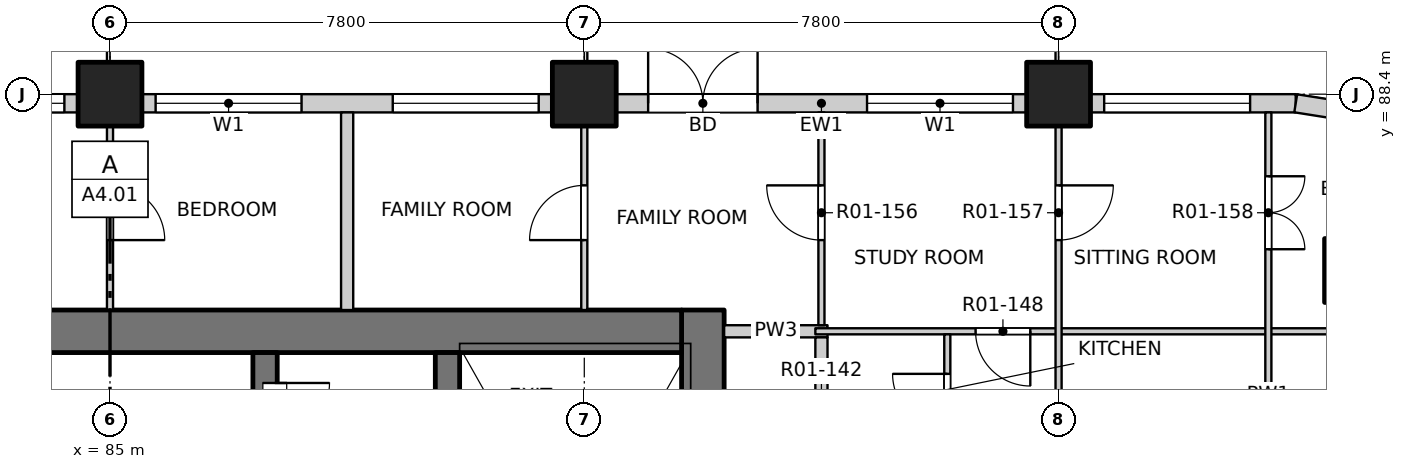
"""IFC4 building model, lengths in metres.
Left out: names, types, materials, properties, quantities, classifications, styles, units other than length and angle.
Written with IfcOpenShell. Run it as: python <this file> out.ifc"""

import sys

from ifc_helpers import new_model, si_unit, direction, frame, frame_2d, origin, origin_2d, place, context, subcontext, project, spatial, rectangle, extrude, element, fill, save


model = new_model("IFC4")
c1 = context("Model", 3, precision=1e-05, world=origin(), true_north=direction((0.0, 1.0)))
c2 = subcontext(c1, "Body", "Model", "MODEL_VIEW")
j1 = project(units=[si_unit("LENGTHUNIT", "METRE"), si_unit("PLANEANGLEUNIT", "RADIAN")], contexts=[c1])
p1 = place(None, origin())
s1 = spatial("IfcSite", under=j1, at=p1, CompositionType="ELEMENT")
p2 = place(p1, origin())
s2 = spatial("IfcBuilding", under=s1, at=p2, CompositionType="ELEMENT")
p3 = place(p2, frame((0.0, 0.0, 19.5)))
s3 = spatial("IfcBuildingStorey", under=s2, at=p3, CompositionType="ELEMENT", Elevation=19.5)
for number, where, z_axis, x_axis in (
    (1, (105.5, 85.5, -0.25), (0.0, 0.0, 1.0), (1.0, 0.0, 0.0)),
    (2, (85.0, 88.4, -0.25), (0.0, 0.0, 1.0), (1.0, 0.0, 0.0)),
    (3, (92.8, 88.4, -0.25), (0.0, 0.0, 1.0), (1.0, 0.0, 0.0)),
    (4, (100.6, 88.4, -0.25), (0.0, 0.0, 1.0), (1.0, 0.0, 0.0)),
):
    element("IfcColumn", number, at=place(p3, frame(where, z_axis=z_axis, x_axis=x_axis)), inside=s3, PredefinedType="COLUMN", context=c2, shape_type="SweptSolid", body=[
        extrude(rectangle(XDim=1.05, YDim=1.05, at=origin_2d()), origin(), (0.0, 0.0, 1.0), 3.4),
    ])
p4 = place(p3, frame((94.75, 77.3, -0.25), z_axis=(0.0, 0.0, 1.0), x_axis=(0.0, 1.0, 0.0)))
e5 = element("IfcWall", 5, at=p4, inside=s3, PredefinedType="SOLIDWALL", context=c2, shape_type="SweptSolid", body=[
    extrude(rectangle(XDim=7.55, YDim=0.7, at=frame_2d((3.775, 0.0))), origin(), (0.0, 0.0, 1.0), 3.4),
])
p5 = place(p4, frame((0.3, 0.0, 0.25)))
e6 = element("IfcOpeningElement", 6, at=p5, cuts=e5, PredefinedType="OPENING", context=c2, shape_type="SweptSolid", body=[
    extrude(rectangle(XDim=1.2, YDim=2.1, at=frame_2d((0.6, 1.05))), frame((0.0, 0.36, 0.0), z_axis=(0.0, -1.0, 0.0), x_axis=(1.0, 0.0, 0.0)), (0.0, 0.0, 1.0), 0.72),
])
p6 = place(p3, frame((75.6, 84.5, -0.25), z_axis=(0.0, 0.0, 1.0), x_axis=(1.0, 0.0, 0.0)))
e7 = element("IfcWall", 7, at=p6, inside=s3, PredefinedType="SOLIDWALL", context=c2, shape_type="SweptSolid", body=[
    extrude(rectangle(XDim=18.8, YDim=0.7, at=frame_2d((9.4, 0.0))), origin(), (0.0, 0.0, 1.0), 3.4),
])
p7 = place(p3, frame((90.55, 77.3, -0.25), z_axis=(0.0, 0.0, 1.0), x_axis=(0.0, 1.0, 0.0)))
e8 = element("IfcWall", 8, at=p7, inside=s3, PredefinedType="SOLIDWALL", context=c2, shape_type="SweptSolid", body=[
    extrude(rectangle(XDim=6.85, YDim=0.4, at=frame_2d((3.425, 0.0))), origin(), (0.0, 0.0, 1.0), 3.4),
])
p8 = place(p3, frame((87.55, 82.1, -0.25), z_axis=(0.0, 0.0, 1.0), x_axis=(0.0, 1.0, 0.0)))
e9 = element("IfcWall", 9, at=p8, inside=s3, PredefinedType="SOLIDWALL", context=c2, shape_type="SweptSolid", body=[
    extrude(rectangle(XDim=2.05, YDim=0.4, at=frame_2d((1.025, 0.0))), origin(), (0.0, 0.0, 1.0), 3.4),
])
p9 = place(p8, frame((0.65, 0.0, 0.25)))
e10 = element("IfcOpeningElement", 10, at=p9, cuts=e9, PredefinedType="OPENING", context=c2, shape_type="SweptSolid", body=[
    extrude(rectangle(XDim=0.9, YDim=2.1, at=frame_2d((0.45, 1.05))), frame((0.0, 0.21, 0.0), z_axis=(0.0, -1.0, 0.0), x_axis=(1.0, 0.0, 0.0)), (0.0, 0.0, 1.0), 0.42),
])
p10 = place(p3, frame((77.725, 88.25, 0.0), z_axis=(0.0, 0.0, 1.0), x_axis=(1.0, 0.0, 0.0)))
e11 = element("IfcWall", 11, at=p10, inside=s3, PredefinedType="SOLIDWALL", context=c2, shape_type="SweptSolid", body=[
    extrude(rectangle(XDim=6.75, YDim=0.3, at=frame_2d((3.375, 0.0))), origin(), (0.0, 0.0, 1.0), 2.7),
])
p11 = place(p10, frame((0.525, 0.0, 0.0)))
e12 = element("IfcOpeningElement", 12, at=p11, cuts=e11, PredefinedType="OPENING", context=c2, shape_type="SweptSolid", body=[
    extrude(rectangle(XDim=1.8, YDim=2.4, at=frame_2d((0.9, 1.2))), frame((0.0, 0.16, 0.0), z_axis=(0.0, -1.0, 0.0), x_axis=(1.0, 0.0, 0.0)), (0.0, 0.0, 1.0), 0.32),
])
p12 = place(p10, frame((4.125, 0.0, 0.9)))
e13 = element("IfcOpeningElement", 13, at=p12, cuts=e11, PredefinedType="OPENING", context=c2, shape_type="SweptSolid", body=[
    extrude(rectangle(XDim=2.4, YDim=1.8, at=frame_2d((1.2, 0.9))), frame((0.0, 0.16, 0.0), z_axis=(0.0, -1.0, 0.0), x_axis=(1.0, 0.0, 0.0)), (0.0, 0.0, 1.0), 0.32),
])
p13 = place(p3, frame((85.525, 88.25, 0.0), z_axis=(0.0, 0.0, 1.0), x_axis=(1.0, 0.0, 0.0)))
e14 = element("IfcWall", 14, at=p13, inside=s3, PredefinedType="SOLIDWALL", context=c2, shape_type="SweptSolid", body=[
    extrude(rectangle(XDim=6.75, YDim=0.3, at=frame_2d((3.375, 0.0))), origin(), (0.0, 0.0, 1.0), 2.7),
])
p14 = place(p13, frame((0.225, 0.0, 0.9)))
e15 = element("IfcOpeningElement", 15, at=p14, cuts=e14, PredefinedType="OPENING", context=c2, shape_type="SweptSolid", body=[
    extrude(rectangle(XDim=2.4, YDim=1.8, at=frame_2d((1.2, 0.9))), frame((0.0, 0.16, 0.0), z_axis=(0.0, -1.0, 0.0), x_axis=(1.0, 0.0, 0.0)), (0.0, 0.0, 1.0), 0.32),
])
p15 = place(p13, frame((4.125, 0.0, 0.9)))
e16 = element("IfcOpeningElement", 16, at=p15, cuts=e14, PredefinedType="OPENING", context=c2, shape_type="SweptSolid", body=[
    extrude(rectangle(XDim=2.4, YDim=1.8, at=frame_2d((1.2, 0.9))), frame((0.0, 0.16, 0.0), z_axis=(0.0, -1.0, 0.0), x_axis=(1.0, 0.0, 0.0)), (0.0, 0.0, 1.0), 0.32),
])
p16 = place(p3, frame((93.325, 88.25, 0.0), z_axis=(0.0, 0.0, 1.0), x_axis=(1.0, 0.0, 0.0)))
e17 = element("IfcWall", 17, at=p16, inside=s3, PredefinedType="SOLIDWALL", context=c2, shape_type="SweptSolid", body=[
    extrude(rectangle(XDim=6.75, YDim=0.3, at=frame_2d((3.375, 0.0))), origin(), (0.0, 0.0, 1.0), 2.7),
])
p17 = place(p16, frame((0.525, 0.0, 0.0)))
e18 = element("IfcOpeningElement", 18, at=p17, cuts=e17, PredefinedType="OPENING", context=c2, shape_type="SweptSolid", body=[
    extrude(rectangle(XDim=1.8, YDim=2.4, at=frame_2d((0.9, 1.2))), frame((0.0, 0.16, 0.0), z_axis=(0.0, -1.0, 0.0), x_axis=(1.0, 0.0, 0.0)), (0.0, 0.0, 1.0), 0.32),
])
p18 = place(p16, frame((4.125, 0.0, 0.9)))
e19 = element("IfcOpeningElement", 19, at=p18, cuts=e17, PredefinedType="OPENING", context=c2, shape_type="SweptSolid", body=[
    extrude(rectangle(XDim=2.4, YDim=1.8, at=frame_2d((1.2, 0.9))), frame((0.0, 0.16, 0.0), z_axis=(0.0, -1.0, 0.0), x_axis=(1.0, 0.0, 0.0)), (0.0, 0.0, 1.0), 0.32),
])
p19 = place(p3, frame((101.125, 88.25, 0.0), z_axis=(0.0, 0.0, 1.0), x_axis=(1.0, 0.0, 0.0)))
e20 = element("IfcWall", 20, at=p19, inside=s3, PredefinedType="SOLIDWALL", context=c2, shape_type="SweptSolid", body=[
    extrude(rectangle(XDim=3.375, YDim=0.3, at=frame_2d((1.688, 0.0))), origin(), (0.0, 0.0, 1.0), 2.7),
])
p20 = place(p19, frame((0.225, 0.0, 0.9)))
e21 = element("IfcOpeningElement", 21, at=p20, cuts=e20, PredefinedType="OPENING", context=c2, shape_type="SweptSolid", body=[
    extrude(rectangle(XDim=2.4, YDim=1.8, at=frame_2d((1.2, 0.9))), frame((0.0, 0.16, 0.0), z_axis=(0.0, -1.0, 0.0), x_axis=(1.0, 0.0, 0.0)), (0.0, 0.0, 1.0), 0.32),
])
p21 = place(p3, frame((105.659, 88.066, 0.0), z_axis=(0.0, 0.0, 1.0), x_axis=(-0.987678452879, 0.156496880861, 0.0)))
e22 = element("IfcWall", 22, at=p21, inside=s3, PredefinedType="SOLIDWALL", context=c2, shape_type="SweptSolid", body=[
    extrude(rectangle(XDim=1.173, YDim=0.3, at=frame_2d((0.586, 0.0))), origin(), (0.0, 0.0, 1.0), 2.7),
])
p22 = place(p3, frame((95.1, 84.5, 0.0), z_axis=(0.0, 0.0, 1.0), x_axis=(1.0, 0.0, 0.0)))
e23 = element("IfcWall", 23, at=p22, inside=s3, PredefinedType="PARTITIONING", context=c2, shape_type="SweptSolid", body=[
    extrude(rectangle(XDim=1.7, YDim=0.2, at=frame_2d((0.85, 0.0))), origin(), (0.0, 0.0, 1.0), 3.15),
])
p23 = place(p3, frame((96.6, 84.5, 0.0), z_axis=(0.0, 0.0, 1.0), x_axis=(1.0, 0.0, 0.0)))
e24 = element("IfcWall", 24, at=p23, inside=s3, PredefinedType="PARTITIONING", context=c2, shape_type="SweptSolid", body=[
    extrude(rectangle(XDim=11.5, YDim=0.1, at=frame_2d((5.75, 0.0))), origin(), (0.0, 0.0, 1.0), 3.15),
])
p24 = place(p23, frame((2.635, 0.0, 0.0)))
e25 = element("IfcOpeningElement", 25, at=p24, cuts=e24, PredefinedType="OPENING", context=c2, shape_type="SweptSolid", body=[
    extrude(rectangle(XDim=0.9, YDim=2.1, at=frame_2d((0.45, 1.05))), frame((0.0, 0.06, 0.0), z_axis=(0.0, -1.0, 0.0), x_axis=(1.0, 0.0, 0.0)), (0.0, 0.0, 1.0), 0.12),
])
p25 = place(p3, frame((85.0, 84.85, 0.0), z_axis=(0.0, 0.0, 1.0), x_axis=(0.0, 1.0, 0.0)))
e26 = element("IfcWall", 26, at=p25, inside=s3, PredefinedType="PARTITIONING", context=c2, shape_type="SweptSolid", body=[
    extrude(rectangle(XDim=3.25, YDim=0.1, at=frame_2d((1.625, 0.0))), origin(), (0.0, 0.0, 1.0), 3.15),
])
p26 = place(p25, frame((1.15, 0.0, 0.0)))
e27 = element("IfcOpeningElement", 27, at=p26, cuts=e26, PredefinedType="OPENING", context=c2, shape_type="SweptSolid", body=[
    extrude(rectangle(XDim=0.9, YDim=2.1, at=frame_2d((0.45, 1.05))), frame((0.0, 0.06, 0.0), z_axis=(0.0, -1.0, 0.0), x_axis=(1.0, 0.0, 0.0)), (0.0, 0.0, 1.0), 0.12),
])
p27 = place(p3, frame((88.9, 84.85, 0.0), z_axis=(0.0, 0.0, 1.0), x_axis=(0.0, 1.0, 0.0)))
e28 = element("IfcWall", 28, at=p27, inside=s3, PredefinedType="PARTITIONING", context=c2, shape_type="SweptSolid", body=[
    extrude(rectangle(XDim=3.25, YDim=0.2, at=frame_2d((1.625, 0.0))), origin(), (0.0, 0.0, 1.0), 3.15),
])
p28 = place(p3, frame((92.8, 84.85, 0.0), z_axis=(0.0, 0.0, 1.0), x_axis=(0.0, 1.0, 0.0)))
e29 = element("IfcWall", 29, at=p28, inside=s3, PredefinedType="PARTITIONING", context=c2, shape_type="SweptSolid", body=[
    extrude(rectangle(XDim=3.25, YDim=0.1, at=frame_2d((1.625, 0.0))), origin(), (0.0, 0.0, 1.0), 3.15),
])
p29 = place(p28, frame((1.15, 0.0, 0.0)))
e30 = element("IfcOpeningElement", 30, at=p29, cuts=e29, PredefinedType="OPENING", context=c2, shape_type="SweptSolid", body=[
    extrude(rectangle(XDim=0.9, YDim=2.1, at=frame_2d((0.45, 1.05))), frame((0.0, 0.06, 0.0), z_axis=(0.0, -1.0, 0.0), x_axis=(1.0, 0.0, 0.0)), (0.0, 0.0, 1.0), 0.12),
])
p30 = place(p3, frame((96.7, 53.4, 0.0), z_axis=(0.0, 0.0, 1.0), x_axis=(0.0, 1.0, 0.0)))
e31 = element("IfcWall", 31, at=p30, inside=s3, PredefinedType="PARTITIONING", context=c2, shape_type="SweptSolid", body=[
    extrude(rectangle(XDim=31.0, YDim=0.2, at=frame_2d((15.5, 0.0))), origin(), (0.0, 0.0, 1.0), 3.15),
])
p31 = place(p30, frame((5.575, 0.0, 0.0)))
e32 = element("IfcOpeningElement", 32, at=p31, cuts=e31, PredefinedType="OPENING", context=c2, shape_type="SweptSolid", body=[
    extrude(rectangle(XDim=1.0, YDim=2.1, at=frame_2d((0.5, 1.05))), frame((0.0, 0.11, 0.0), z_axis=(0.0, -1.0, 0.0), x_axis=(1.0, 0.0, 0.0)), (0.0, 0.0, 1.0), 0.22),
])
p32 = place(p30, frame((10.075, 0.0, 0.0)))
e33 = element("IfcOpeningElement", 33, at=p32, cuts=e31, PredefinedType="OPENING", context=c2, shape_type="SweptSolid", body=[
    extrude(rectangle(XDim=1.0, YDim=2.1, at=frame_2d((0.5, 1.05))), frame((0.0, 0.11, 0.0), z_axis=(0.0, -1.0, 0.0), x_axis=(1.0, 0.0, 0.0)), (0.0, 0.0, 1.0), 0.22),
])
p33 = place(p30, frame((28.975, 0.0, 0.0)))
e34 = element("IfcOpeningElement", 34, at=p33, cuts=e31, PredefinedType="OPENING", context=c2, shape_type="SweptSolid", body=[
    extrude(rectangle(XDim=1.0, YDim=2.1, at=frame_2d((0.5, 1.05))), frame((0.0, 0.11, 0.0), z_axis=(0.0, -1.0, 0.0), x_axis=(1.0, 0.0, 0.0)), (0.0, 0.0, 1.0), 0.22),
])
p34 = place(p3, frame((96.7, 84.6, 0.0), z_axis=(0.0, 0.0, 1.0), x_axis=(0.0, 1.0, 0.0)))
e35 = element("IfcWall", 35, at=p34, inside=s3, PredefinedType="PARTITIONING", context=c2, shape_type="SweptSolid", body=[
    extrude(rectangle(XDim=3.5, YDim=0.1, at=frame_2d((1.75, 0.0))), origin(), (0.0, 0.0, 1.0), 3.15),
])
p35 = place(p34, frame((1.4, 0.0, 0.0)))
e36 = element("IfcOpeningElement", 36, at=p35, cuts=e35, PredefinedType="OPENING", context=c2, shape_type="SweptSolid", body=[
    extrude(rectangle(XDim=0.9, YDim=2.1, at=frame_2d((0.45, 1.05))), frame((0.0, 0.06, 0.0), z_axis=(0.0, -1.0, 0.0), x_axis=(1.0, 0.0, 0.0)), (0.0, 0.0, 1.0), 0.12),
])
p36 = place(p3, frame((98.77, 82.25, 0.0), z_axis=(0.0, 0.0, 1.0), x_axis=(0.0, 1.0, 0.0)))
e37 = element("IfcWall", 37, at=p36, inside=s3, PredefinedType="PARTITIONING", context=c2, shape_type="SweptSolid", body=[
    extrude(rectangle(XDim=2.2, YDim=0.1, at=frame_2d((1.1, 0.0))), origin(), (0.0, 0.0, 1.0), 3.15),
])
p37 = place(p36, frame((0.65, 0.0, 0.0)))
e38 = element("IfcOpeningElement", 38, at=p37, cuts=e37, PredefinedType="OPENING", context=c2, shape_type="SweptSolid", body=[
    extrude(rectangle(XDim=0.9, YDim=2.1, at=frame_2d((0.45, 1.05))), frame((0.0, 0.06, 0.0), z_axis=(0.0, -1.0, 0.0), x_axis=(1.0, 0.0, 0.0)), (0.0, 0.0, 1.0), 0.12),
])
p38 = place(p3, frame((100.6, 80.6, 0.0), z_axis=(0.0, 0.0, 1.0), x_axis=(0.0, 1.0, 0.0)))
e39 = element("IfcWall", 39, at=p38, inside=s3, PredefinedType="PARTITIONING", context=c2, shape_type="SweptSolid", body=[
    extrude(rectangle(XDim=7.5, YDim=0.1, at=frame_2d((3.75, 0.0))), origin(), (0.0, 0.0, 1.0), 2.55),
])
p39 = place(p38, frame((1.5, 0.0, 0.0)))
e40 = element("IfcOpeningElement", 40, at=p39, cuts=e39, PredefinedType="OPENING", context=c2, shape_type="SweptSolid", body=[
    extrude(rectangle(XDim=0.9, YDim=2.1, at=frame_2d((0.45, 1.05))), frame((0.0, 0.06, 0.0), z_axis=(0.0, -1.0, 0.0), x_axis=(1.0, 0.0, 0.0)), (0.0, 0.0, 1.0), 0.12),
])
p40 = place(p38, frame((5.4, 0.0, 0.0)))
e41 = element("IfcOpeningElement", 41, at=p40, cuts=e39, PredefinedType="OPENING", context=c2, shape_type="SweptSolid", body=[
    extrude(rectangle(XDim=0.9, YDim=2.1, at=frame_2d((0.45, 1.05))), frame((0.0, 0.06, 0.0), z_axis=(0.0, -1.0, 0.0), x_axis=(1.0, 0.0, 0.0)), (0.0, 0.0, 1.0), 0.12),
])
p41 = place(p3, frame((104.05, 76.8, 0.0), z_axis=(0.0, 0.0, 1.0), x_axis=(0.0, 1.0, 0.0)))
e42 = element("IfcWall", 42, at=p41, inside=s3, PredefinedType="PARTITIONING", context=c2, shape_type="SweptSolid", body=[
    extrude(rectangle(XDim=11.3, YDim=0.1, at=frame_2d((5.65, 0.0))), origin(), (0.0, 0.0, 1.0), 3.15),
])
p42 = place(p41, frame((1.25, 0.0, 0.0)))
e43 = element("IfcOpeningElement", 43, at=p42, cuts=e42, PredefinedType="OPENING", context=c2, shape_type="SweptSolid", body=[
    extrude(rectangle(XDim=1.2, YDim=2.1, at=frame_2d((0.6, 1.05))), frame((0.0, 0.06, 0.0), z_axis=(0.0, -1.0, 0.0), x_axis=(1.0, 0.0, 0.0)), (0.0, 0.0, 1.0), 0.12),
])
p43 = place(p41, frame((5.15, 0.0, 0.0)))
e44 = element("IfcOpeningElement", 44, at=p43, cuts=e42, PredefinedType="OPENING", context=c2, shape_type="SweptSolid", body=[
    extrude(rectangle(XDim=1.2, YDim=2.1, at=frame_2d((0.6, 1.05))), frame((0.0, 0.06, 0.0), z_axis=(0.0, -1.0, 0.0), x_axis=(1.0, 0.0, 0.0)), (0.0, 0.0, 1.0), 0.12),
])
p44 = place(p41, frame((9.05, 0.0, 0.0)))
e45 = element("IfcOpeningElement", 45, at=p44, cuts=e42, PredefinedType="OPENING", context=c2, shape_type="SweptSolid", body=[
    extrude(rectangle(XDim=1.2, YDim=2.1, at=frame_2d((0.6, 1.05))), frame((0.0, 0.06, 0.0), z_axis=(0.0, -1.0, 0.0), x_axis=(1.0, 0.0, 0.0)), (0.0, 0.0, 1.0), 0.12),
])
p45 = place(p12, origin())
e46 = element("IfcWindow", 46, at=p45, inside=s3, PartitioningType="DOUBLE_PANEL_VERTICAL", PredefinedType="WINDOW", context=c2, shape_type="SweptSolid", body=[
    extrude(rectangle(XDim=2.4, YDim=1.8, at=frame_2d((1.2, 0.9))), frame((0.0, 0.03, 0.0), z_axis=(0.0, -1.0, 0.0), x_axis=(1.0, 0.0, 0.0)), (0.0, 0.0, 1.0), 0.06),
])
fill(e13, e46)
p46 = place(p14, origin())
e47 = element("IfcWindow", 47, at=p46, inside=s3, PartitioningType="DOUBLE_PANEL_VERTICAL", PredefinedType="WINDOW", context=c2, shape_type="SweptSolid", body=[
    extrude(rectangle(XDim=2.4, YDim=1.8, at=frame_2d((1.2, 0.9))), frame((0.0, 0.03, 0.0), z_axis=(0.0, -1.0, 0.0), x_axis=(1.0, 0.0, 0.0)), (0.0, 0.0, 1.0), 0.06),
])
fill(e15, e47)
p47 = place(p15, origin())
e48 = element("IfcWindow", 48, at=p47, inside=s3, PartitioningType="DOUBLE_PANEL_VERTICAL", PredefinedType="WINDOW", context=c2, shape_type="SweptSolid", body=[
    extrude(rectangle(XDim=2.4, YDim=1.8, at=frame_2d((1.2, 0.9))), frame((0.0, 0.03, 0.0), z_axis=(0.0, -1.0, 0.0), x_axis=(1.0, 0.0, 0.0)), (0.0, 0.0, 1.0), 0.06),
])
fill(e16, e48)
p48 = place(p17, origin())
e49 = element("IfcDoor", 49, at=p48, inside=s3, OperationType="DOUBLE_DOOR_SINGLE_SWING", PredefinedType="DOOR", context=c2, shape_type="SweptSolid", body=[
    extrude(rectangle(XDim=1.8, YDim=2.4, at=frame_2d((0.9, 1.2))), frame((0.0, 0.025, 0.0), z_axis=(0.0, -1.0, 0.0), x_axis=(1.0, 0.0, 0.0)), (0.0, 0.0, 1.0), 0.05),
])
fill(e18, e49)
p49 = place(p18, origin())
e50 = element("IfcWindow", 50, at=p49, inside=s3, PartitioningType="DOUBLE_PANEL_VERTICAL", PredefinedType="WINDOW", context=c2, shape_type="SweptSolid", body=[
    extrude(rectangle(XDim=2.4, YDim=1.8, at=frame_2d((1.2, 0.9))), frame((0.0, 0.03, 0.0), z_axis=(0.0, -1.0, 0.0), x_axis=(1.0, 0.0, 0.0)), (0.0, 0.0, 1.0), 0.06),
])
fill(e19, e50)
p50 = place(p20, origin())
e51 = element("IfcWindow", 51, at=p50, inside=s3, PartitioningType="DOUBLE_PANEL_VERTICAL", PredefinedType="WINDOW", context=c2, shape_type="SweptSolid", body=[
    extrude(rectangle(XDim=2.4, YDim=1.8, at=frame_2d((1.2, 0.9))), frame((0.0, 0.03, 0.0), z_axis=(0.0, -1.0, 0.0), x_axis=(1.0, 0.0, 0.0)), (0.0, 0.0, 1.0), 0.06),
])
fill(e21, e51)
p51 = place(p9, origin())
e52 = element("IfcDoor", 52, at=p51, inside=s3, OperationType="SINGLE_SWING_LEFT", PredefinedType="DOOR", context=c2, shape_type="SweptSolid", body=[
    extrude(rectangle(XDim=0.9, YDim=2.1, at=frame_2d((0.45, 1.05))), frame((0.0, -0.135, 0.0), z_axis=(0.0, -1.0, 0.0), x_axis=(1.0, 0.0, 0.0)), (0.0, 0.0, 1.0), 0.05),
])
fill(e10, e52)
p52 = place(p37, origin())
e53 = element("IfcDoor", 53, at=p52, inside=s3, OperationType="SINGLE_SWING_RIGHT", PredefinedType="DOOR", context=c2, shape_type="SweptSolid", body=[
    extrude(rectangle(XDim=0.9, YDim=2.1, at=frame_2d((0.45, 1.05))), frame((0.0, 0.025, 0.0), z_axis=(0.0, -1.0, 0.0), x_axis=(1.0, 0.0, 0.0)), (0.0, 0.0, 1.0), 0.05),
])
fill(e38, e53)
p53 = place(p24, origin())
e54 = element("IfcDoor", 54, at=p53, inside=s3, OperationType="SINGLE_SWING_LEFT", PredefinedType="DOOR", context=c2, shape_type="SweptSolid", body=[
    extrude(rectangle(XDim=0.9, YDim=2.1, at=frame_2d((0.45, 1.05))), frame((0.0, 0.025, 0.0), z_axis=(0.0, -1.0, 0.0), x_axis=(1.0, 0.0, 0.0)), (0.0, 0.0, 1.0), 0.05),
])
fill(e25, e54)
p54 = place(p26, origin())
e55 = element("IfcDoor", 55, at=p54, inside=s3, OperationType="SINGLE_SWING_RIGHT", PredefinedType="DOOR", context=c2, shape_type="SweptSolid", body=[
    extrude(rectangle(XDim=0.9, YDim=2.1, at=frame_2d((0.45, 1.05))), frame((0.0, 0.025, 0.0), z_axis=(0.0, -1.0, 0.0), x_axis=(1.0, 0.0, 0.0)), (0.0, 0.0, 1.0), 0.05),
])
fill(e27, e55)
p55 = place(p29, origin())
e56 = element("IfcDoor", 56, at=p55, inside=s3, OperationType="SINGLE_SWING_LEFT", PredefinedType="DOOR", context=c2, shape_type="SweptSolid", body=[
    extrude(rectangle(XDim=0.9, YDim=2.1, at=frame_2d((0.45, 1.05))), frame((0.0, 0.025, 0.0), z_axis=(0.0, -1.0, 0.0), x_axis=(1.0, 0.0, 0.0)), (0.0, 0.0, 1.0), 0.05),
])
fill(e30, e56)
p56 = place(p35, origin())
e57 = element("IfcDoor", 57, at=p56, inside=s3, OperationType="SINGLE_SWING_RIGHT", PredefinedType="DOOR", context=c2, shape_type="SweptSolid", body=[
    extrude(rectangle(XDim=0.9, YDim=2.1, at=frame_2d((0.45, 1.05))), frame((0.0, 0.025, 0.0), z_axis=(0.0, -1.0, 0.0), x_axis=(1.0, 0.0, 0.0)), (0.0, 0.0, 1.0), 0.05),
])
fill(e36, e57)
p57 = place(p40, origin())
e58 = element("IfcDoor", 58, at=p57, inside=s3, OperationType="SINGLE_SWING_LEFT", PredefinedType="DOOR", context=c2, shape_type="SweptSolid", body=[
    extrude(rectangle(XDim=0.9, YDim=2.1, at=frame_2d((0.45, 1.05))), frame((0.0, 0.025, 0.0), z_axis=(0.0, -1.0, 0.0), x_axis=(1.0, 0.0, 0.0)), (0.0, 0.0, 1.0), 0.05),
])
fill(e41, e58)
p58 = place(p44, origin())
e59 = element("IfcDoor", 59, at=p58, inside=s3, OperationType="DOUBLE_DOOR_SINGLE_SWING", PredefinedType="DOOR", context=c2, shape_type="SweptSolid", body=[
    extrude(rectangle(XDim=1.2, YDim=2.1, at=frame_2d((0.6, 1.05))), frame((0.0, 0.025, 0.0), z_axis=(0.0, -1.0, 0.0), x_axis=(1.0, 0.0, 0.0)), (0.0, 0.0, 1.0), 0.05),
])
fill(e45, e59)
save(model, sys.argv[1])
